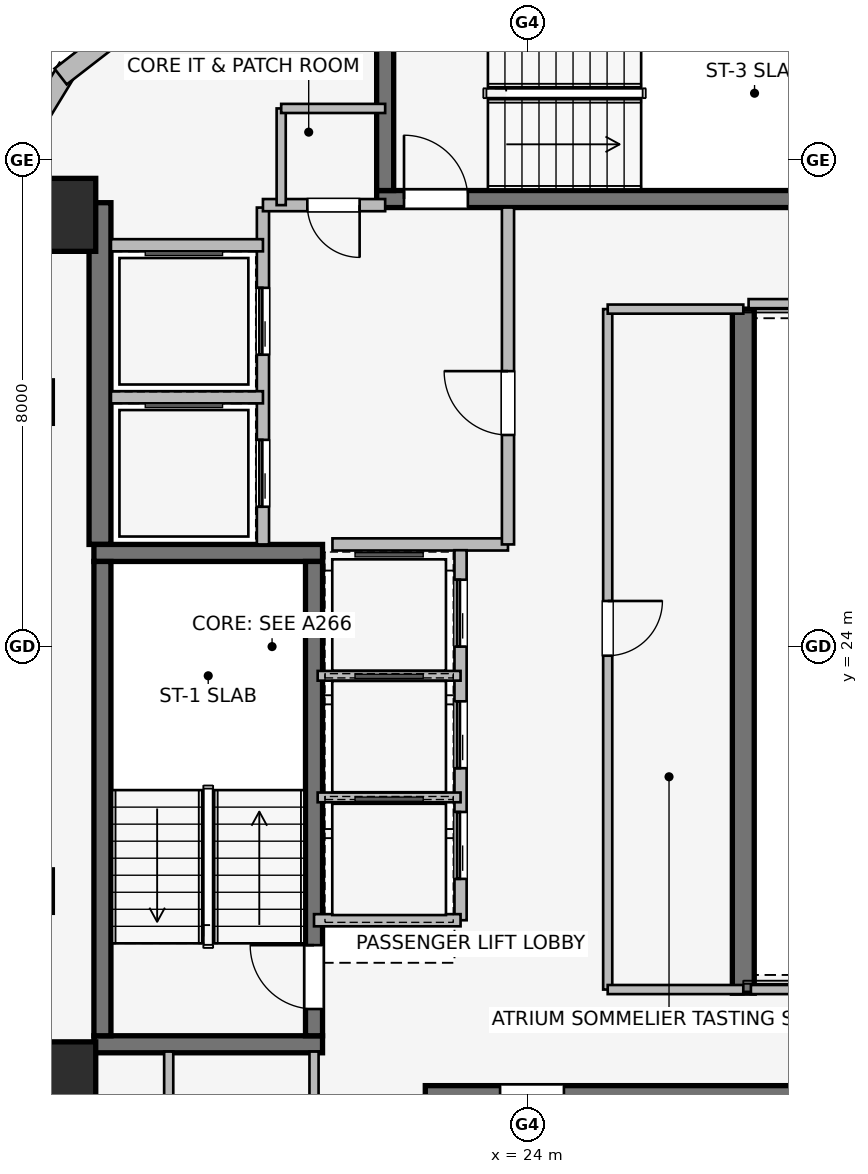
"""IFC4 building model, lengths in metres.
Left out: names, types, materials, properties, quantities, classifications, styles, units other than length and angle.
Written with IfcOpenShell. Run it as: python <this file> out.ifc"""

import sys

from ifc_helpers import new_model, si_unit, direction, frame, frame_2d, origin, origin_2d, place, context, subcontext, project, spatial, rectangle, extrude, element, fill, save


model = new_model("IFC4")
c1 = context("Model", 3, precision=1e-05, world=origin(), true_north=direction((0.0, 1.0)))
c2 = subcontext(c1, "Body", "Model", "MODEL_VIEW")
j1 = project(units=[si_unit("LENGTHUNIT", "METRE"), si_unit("PLANEANGLEUNIT", "RADIAN")], contexts=[c1])
p1 = place(None, origin())
s1 = spatial("IfcSite", under=j1, at=p1, CompositionType="ELEMENT")
p2 = place(p1, origin())
s2 = spatial("IfcBuilding", under=s1, at=p2, CompositionType="ELEMENT")
p3 = place(p2, frame((0.0, 0.0, 234.8)))
s3 = spatial("IfcBuildingStorey", under=s2, at=p3, CompositionType="ELEMENT", Elevation=234.8)
p4 = place(p3, frame((16.97, 25.68, 0.0), z_axis=(0.0, 0.0, 1.0), x_axis=(0.0, 1.0, 0.0)))
e1 = element("IfcWall", 1, at=p4, inside=s3, PredefinedType="SHEAR", context=c2, shape_type="SweptSolid", body=[
    extrude(rectangle(XDim=5.62, YDim=0.36, at=frame_2d((2.81, 0.0))), origin(), (0.0, 0.0, 1.0), 3.55),
])
p5 = place(p3, frame((27.55, 29.55, 0.0), z_axis=(0.0, 0.0, 1.0), x_axis=(0.0, -1.0, 0.0)))
e2 = element("IfcWall", 2, at=p5, inside=s3, PredefinedType="SHEAR", context=c2, shape_type="SweptSolid", body=[
    extrude(rectangle(XDim=11.25, YDim=0.36, at=frame_2d((5.625, 0.0))), origin(), (0.0, 0.0, 1.0), 3.55),
])
for number, where, z_axis, x_axis in (
    (3, (16.87, 17.46, 0.0), (0.0, 0.0, 1.0), (1.0, 0.0, 0.0)),
    (4, (20.63, 25.54, 0.0), (0.0, 0.0, 1.0), (-1.0, 0.0, 0.0)),
):
    element("IfcWall", number, at=place(p3, frame(where, z_axis=z_axis, x_axis=x_axis)), inside=s3, PredefinedType="SHEAR", context=c2, shape_type="SweptSolid", body=[
        extrude(rectangle(XDim=3.76, YDim=0.28, at=frame_2d((1.88, 0.0))), origin(), (0.0, 0.0, 1.0), 3.55),
    ])
p6 = place(p3, frame((17.01, 25.4, 0.0), z_axis=(0.0, 0.0, 1.0), x_axis=(0.0, -1.0, 0.0)))
e5 = element("IfcWall", 5, at=p6, inside=s3, PredefinedType="SHEAR", context=c2, shape_type="SweptSolid", body=[
    extrude(rectangle(XDim=7.8, YDim=0.28, at=frame_2d((3.9, 0.0))), origin(), (0.0, 0.0, 1.0), 3.55),
])
p7 = place(p3, frame((20.49, 17.6, 0.0), z_axis=(0.0, 0.0, 1.0), x_axis=(0.0, 1.0, 0.0)))
e6 = element("IfcWall", 6, at=p7, inside=s3, PredefinedType="SHEAR", context=c2, shape_type="SweptSolid", body=[
    extrude(rectangle(XDim=7.8, YDim=0.28, at=frame_2d((3.9, 0.0))), origin(), (0.0, 0.0, 1.0), 3.55),
])
p8 = place(p7, frame((0.44, 0.0, 0.0)))
e7 = element("IfcOpeningElement", 7, at=p8, cuts=e6, PredefinedType="OPENING", context=c2, shape_type="SweptSolid", body=[
    extrude(rectangle(XDim=1.05, YDim=2.0, at=frame_2d((0.525, 1.0))), frame((0.0, 0.15, 0.0), z_axis=(0.0, -1.0, 0.0), x_axis=(1.0, 0.0, 0.0)), (0.0, 0.0, 1.0), 0.3),
])
p9 = place(p3, frame((30.68, 16.64, 0.0), z_axis=(0.0, 0.0, 1.0), x_axis=(-1.0, 0.0, 0.0)))
e8 = element("IfcWall", 8, at=p9, inside=s3, PredefinedType="SHEAR", context=c2, shape_type="SweptSolid", body=[
    extrude(rectangle(XDim=8.36, YDim=0.28, at=frame_2d((4.18, 0.0))), origin(), (0.0, 0.0, 1.0), 3.55),
])
p10 = place(p9, frame((6.08, 0.0, 0.0)))
e9 = element("IfcOpeningElement", 9, at=p10, cuts=e8, PredefinedType="OPENING", context=c2, shape_type="SweptSolid", body=[
    extrude(rectangle(XDim=1.05, YDim=2.0, at=frame_2d((0.525, 1.0))), frame((0.0, 0.15, 0.0), z_axis=(0.0, -1.0, 0.0), x_axis=(1.0, 0.0, 0.0)), (0.0, 0.0, 1.0), 0.3),
])
p11 = place(p3, frame((21.52, 31.36, 0.0), z_axis=(0.0, 0.0, 1.0), x_axis=(1.0, 0.0, 0.0)))
e10 = element("IfcWall", 10, at=p11, inside=s3, PredefinedType="SHEAR", context=c2, shape_type="SweptSolid", body=[
    extrude(rectangle(XDim=8.36, YDim=0.28, at=frame_2d((4.18, 0.0))), origin(), (0.0, 0.0, 1.0), 3.55),
])
p12 = place(p11, frame((0.45, 0.0, 0.0)))
e11 = element("IfcOpeningElement", 11, at=p12, cuts=e10, PredefinedType="OPENING", context=c2, shape_type="SweptSolid", body=[
    extrude(rectangle(XDim=1.05, YDim=2.0, at=frame_2d((0.525, 1.0))), frame((0.0, 0.15, 0.0), z_axis=(0.0, -1.0, 0.0), x_axis=(1.0, 0.0, 0.0)), (0.0, 0.0, 1.0), 0.3),
])
p13 = place(p3, frame((21.66, 34.7, 0.0), z_axis=(0.0, 0.0, 1.0), x_axis=(0.0, -1.0, 0.0)))
e12 = element("IfcWall", 12, at=p13, inside=s3, PredefinedType="SHEAR", context=c2, shape_type="SweptSolid", body=[
    extrude(rectangle(XDim=3.2, YDim=0.28, at=frame_2d((1.6, 0.0))), origin(), (0.0, 0.0, 1.0), 3.55),
])
for number, where, z_axis, x_axis in (
    (13, (16.3, 16.9, 0.0), (0.0, 0.0, 1.0), (1.0, 0.0, 0.0)),
    (14, (16.3, 31.1, 0.0), (0.0, 0.0, 1.0), (1.0, 0.0, 0.0)),
):
    element("IfcColumn", number, at=place(p3, frame(where, z_axis=z_axis, x_axis=x_axis)), inside=s3, PredefinedType="COLUMN", context=c2, shape_type="SweptSolid", body=[
        extrude(rectangle(XDim=1.2, YDim=1.2, at=origin_2d()), origin(), (0.0, 0.0, 1.0), 3.55),
    ])
p14 = place(p3, frame((15.574, 32.082, 0.0), z_axis=(0.0, 0.0, 1.0), x_axis=(0.520325409202, 0.853968072318, 0.0)))
e15 = element("IfcWall", 15, at=p14, inside=s3, PredefinedType="STANDARD", context=c2, shape_type="SweptSolid", body=[
    extrude(rectangle(XDim=1.678, YDim=0.33, at=frame_2d((0.839, 0.0))), origin(), (0.0, 0.0, 1.0), 3.26),
])
p15 = place(p3, frame((16.322, 33.375, 0.0), z_axis=(0.0, 0.0, 1.0), x_axis=(0.790691856293, 0.61221433207, 0.0)))
e16 = element("IfcWall", 16, at=p15, inside=s3, PredefinedType="STANDARD", context=c2, shape_type="SweptSolid", body=[
    extrude(rectangle(XDim=1.676, YDim=0.33, at=frame_2d((0.838, 0.0))), origin(), (0.0, 0.0, 1.0), 3.26),
])
p16 = place(p3, frame((19.65, 25.68, 0.0), z_axis=(0.0, 0.0, 1.0), x_axis=(0.0, 1.0, 0.0)))
e17 = element("IfcWall", 17, at=p16, inside=s3, PredefinedType="PARTITIONING", context=c2, shape_type="SweptSolid", body=[
    extrude(rectangle(XDim=5.54, YDim=0.2, at=frame_2d((2.77, 0.0))), origin(), (0.0, 0.0, 1.0), 3.26),
])
p17 = place(p16, frame((0.62, 0.0, 0.0)))
e18 = element("IfcOpeningElement", 18, at=p17, cuts=e17, PredefinedType="OPENING", context=c2, shape_type="SweptSolid", body=[
    extrude(rectangle(XDim=1.1, YDim=2.2, at=frame_2d((0.55, 1.1))), frame((0.0, 0.11, 0.0), z_axis=(0.0, -1.0, 0.0), x_axis=(1.0, 0.0, 0.0)), (0.0, 0.0, 1.0), 0.22),
])
p18 = place(p16, frame((3.12, 0.0, 0.0)))
e19 = element("IfcOpeningElement", 19, at=p18, cuts=e17, PredefinedType="OPENING", context=c2, shape_type="SweptSolid", body=[
    extrude(rectangle(XDim=1.1, YDim=2.2, at=frame_2d((0.55, 1.1))), frame((0.0, 0.11, 0.0), z_axis=(0.0, -1.0, 0.0), x_axis=(1.0, 0.0, 0.0)), (0.0, 0.0, 1.0), 0.22),
])
p19 = place(p3, frame((20.793, 25.68, 0.0), z_axis=(0.0, 0.0, 1.0), x_axis=(1.0, 0.0, 0.0)))
e20 = element("IfcWall", 20, at=p19, inside=s3, PredefinedType="PARTITIONING", context=c2, shape_type="SweptSolid", body=[
    extrude(rectangle(XDim=2.887, YDim=0.2, at=frame_2d((1.443, 0.0))), origin(), (0.0, 0.0, 1.0), 3.26),
])
p20 = place(p3, frame((23.68, 25.68, 0.0), z_axis=(0.0, 0.0, 1.0), x_axis=(0.0, 1.0, 0.0)))
e21 = element("IfcWall", 21, at=p20, inside=s3, PredefinedType="PARTITIONING", context=c2, shape_type="SweptSolid", body=[
    extrude(rectangle(XDim=5.54, YDim=0.2, at=frame_2d((2.77, 0.0))), origin(), (0.0, 0.0, 1.0), 3.26),
])
p21 = place(p20, frame((1.8, 0.0, 0.0)))
e22 = element("IfcOpeningElement", 22, at=p21, cuts=e21, PredefinedType="OPENING", context=c2, shape_type="SweptSolid", body=[
    extrude(rectangle(XDim=1.05, YDim=2.0, at=frame_2d((0.525, 1.0))), frame((0.0, 0.11, 0.0), z_axis=(0.0, -1.0, 0.0), x_axis=(1.0, 0.0, 0.0)), (0.0, 0.0, 1.0), 0.22),
])
p22 = place(p3, frame((21.66, 31.26, 0.0), z_axis=(0.0, 0.0, 1.0), x_axis=(-1.0, 0.0, 0.0)))
e23 = element("IfcWall", 23, at=p22, inside=s3, PredefinedType="PARTITIONING", context=c2, shape_type="SweptSolid", body=[
    extrude(rectangle(XDim=2.01, YDim=0.2, at=frame_2d((1.005, 0.0))), origin(), (0.0, 0.0, 1.0), 3.26),
])
p23 = place(p22, frame((0.42, 0.0, 0.0)))
e24 = element("IfcOpeningElement", 24, at=p23, cuts=e23, PredefinedType="OPENING", context=c2, shape_type="SweptSolid", body=[
    extrude(rectangle(XDim=0.86, YDim=2.0, at=frame_2d((0.43, 1.0))), frame((0.0, 0.11, 0.0), z_axis=(0.0, -1.0, 0.0), x_axis=(1.0, 0.0, 0.0)), (0.0, 0.0, 1.0), 0.22),
])
p24 = place(p3, frame((17.15, 28.1, 0.0), z_axis=(0.0, 0.0, 1.0), x_axis=(1.0, 0.0, 0.0)))
e25 = element("IfcWall", 25, at=p24, inside=s3, PredefinedType="PARTITIONING", context=c2, shape_type="SweptSolid", body=[
    extrude(rectangle(XDim=2.5, YDim=0.2, at=frame_2d((1.25, 0.0))), origin(), (0.0, 0.0, 1.0), 3.26),
])
p25 = place(p3, frame((19.65, 30.6, 0.0), z_axis=(0.0, 0.0, 1.0), x_axis=(-1.0, 0.0, 0.0)))
e26 = element("IfcWall", 26, at=p25, inside=s3, PredefinedType="PARTITIONING", context=c2, shape_type="SweptSolid", body=[
    extrude(rectangle(XDim=2.5, YDim=0.2, at=frame_2d((1.25, 0.0))), origin(), (0.0, 0.0, 1.0), 2.16),
])
p26 = place(p3, frame((22.9, 19.5, 0.0), z_axis=(0.0, 0.0, 1.0), x_axis=(0.0, 1.0, 0.0)))
e27 = element("IfcWall", 27, at=p26, inside=s3, PredefinedType="PARTITIONING", context=c2, shape_type="SweptSolid", body=[
    extrude(rectangle(XDim=6.085, YDim=0.2, at=frame_2d((3.042, 0.0))), origin(), (0.0, 0.0, 1.0), 3.26),
])
p27 = place(p26, frame((0.68, 0.0, 0.0)))
e28 = element("IfcOpeningElement", 28, at=p27, cuts=e27, PredefinedType="OPENING", context=c2, shape_type="SweptSolid", body=[
    extrude(rectangle(XDim=1.1, YDim=2.2, at=frame_2d((0.55, 1.1))), frame((0.0, 0.11, 0.0), z_axis=(0.0, -1.0, 0.0), x_axis=(1.0, 0.0, 0.0)), (0.0, 0.0, 1.0), 0.22),
])
p28 = place(p26, frame((2.5, 0.0, 0.0)))
e29 = element("IfcOpeningElement", 29, at=p28, cuts=e27, PredefinedType="OPENING", context=c2, shape_type="SweptSolid", body=[
    extrude(rectangle(XDim=1.1, YDim=2.2, at=frame_2d((0.55, 1.1))), frame((0.0, 0.11, 0.0), z_axis=(0.0, -1.0, 0.0), x_axis=(1.0, 0.0, 0.0)), (0.0, 0.0, 1.0), 0.22),
])
p29 = place(p26, frame((4.5, 0.0, 0.0)))
e30 = element("IfcOpeningElement", 30, at=p29, cuts=e27, PredefinedType="OPENING", context=c2, shape_type="SweptSolid", body=[
    extrude(rectangle(XDim=1.1, YDim=2.2, at=frame_2d((0.55, 1.1))), frame((0.0, 0.11, 0.0), z_axis=(0.0, -1.0, 0.0), x_axis=(1.0, 0.0, 0.0)), (0.0, 0.0, 1.0), 0.22),
])
p30 = place(p3, frame((20.49, 19.5, 0.0), z_axis=(0.0, 0.0, 1.0), x_axis=(1.0, 0.0, 0.0)))
e31 = element("IfcWall", 31, at=p30, inside=s3, PredefinedType="PARTITIONING", context=c2, shape_type="SweptSolid", body=[
    extrude(rectangle(XDim=2.41, YDim=0.2, at=frame_2d((1.205, 0.0))), origin(), (0.0, 0.0, 1.0), 2.16),
])
for number, where, z_axis, x_axis in (
    (32, (20.55, 21.52, 0.0), (0.0, 0.0, 1.0), (1.0, 0.0, 0.0)),
    (33, (20.55, 23.52, 0.0), (0.0, 0.0, 1.0), (1.0, 0.0, 0.0)),
):
    element("IfcWall", number, at=place(p3, frame(where, z_axis=z_axis, x_axis=x_axis)), inside=s3, PredefinedType="PARTITIONING", context=c2, shape_type="SweptSolid", body=[
        extrude(rectangle(XDim=2.35, YDim=0.16, at=frame_2d((1.175, 0.0))), origin(), (0.0, 0.0, 1.0), 3.26),
    ])
p31 = place(p3, frame((25.32, 29.55, 0.0), z_axis=(0.0, 0.0, 1.0), x_axis=(0.0, -1.0, 0.0)))
e34 = element("IfcWall", 34, at=p31, inside=s3, PredefinedType="PARTITIONING", context=c2, shape_type="SweptSolid", body=[
    extrude(rectangle(XDim=11.19, YDim=0.15, at=frame_2d((5.595, 0.0))), origin(), (0.0, 0.0, 1.0), 3.26),
])
p32 = place(p31, frame((4.8, 0.0, 0.0)))
e35 = element("IfcOpeningElement", 35, at=p32, cuts=e34, PredefinedType="OPENING", context=c2, shape_type="SweptSolid", body=[
    extrude(rectangle(XDim=0.9, YDim=2.0, at=frame_2d((0.45, 1.0))), frame((0.0, 0.085, 0.0), z_axis=(0.0, -1.0, 0.0), x_axis=(1.0, 0.0, 0.0)), (0.0, 0.0, 1.0), 0.17),
])
p33 = place(p3, frame((25.32, 18.36, 0.0), z_axis=(0.0, 0.0, 1.0), x_axis=(1.0, 0.0, 0.0)))
e36 = element("IfcWall", 36, at=p33, inside=s3, PredefinedType="PARTITIONING", context=c2, shape_type="SweptSolid", body=[
    extrude(rectangle(XDim=2.23, YDim=0.15, at=frame_2d((1.115, 0.0))), origin(), (0.0, 0.0, 1.0), 3.26),
])
p34 = place(p3, frame((27.55, 29.55, 0.0), z_axis=(0.0, 0.0, 1.0), x_axis=(-1.0, 0.0, 0.0)))
e37 = element("IfcWall", 37, at=p34, inside=s3, PredefinedType="PARTITIONING", context=c2, shape_type="SweptSolid", body=[
    extrude(rectangle(XDim=2.23, YDim=0.15, at=frame_2d((1.115, 0.0))), origin(), (0.0, 0.0, 1.0), 2.16),
])
p35 = place(p3, frame((18.1, 17.34, 0.0), z_axis=(0.0, 0.0, 1.0), x_axis=(0.0, -1.0, 0.0)))
e38 = element("IfcWall", 38, at=p35, inside=s3, PredefinedType="PARTITIONING", context=c2, shape_type="SweptSolid", body=[
    extrude(rectangle(XDim=4.133, YDim=0.15, at=frame_2d((2.066, 0.0))), origin(), (0.0, 0.0, 1.0), 3.26),
])
p36 = place(p3, frame((20.49, 13.2, 0.0), z_axis=(0.0, 0.0, 1.0), x_axis=(0.0, 1.0, 0.0)))
e39 = element("IfcWall", 39, at=p36, inside=s3, PredefinedType="PARTITIONING", context=c2, shape_type="SweptSolid", body=[
    extrude(rectangle(XDim=4.14, YDim=0.15, at=frame_2d((2.07, 0.0))), origin(), (0.0, 0.0, 1.0), 3.26),
])
p37 = place(p36, frame((1.25, 0.0, 0.0)))
e40 = element("IfcOpeningElement", 40, at=p37, cuts=e39, PredefinedType="OPENING", context=c2, shape_type="SweptSolid", body=[
    extrude(rectangle(XDim=0.9, YDim=2.0, at=frame_2d((0.45, 1.0))), frame((0.0, 0.085, 0.0), z_axis=(0.0, -1.0, 0.0), x_axis=(1.0, 0.0, 0.0)), (0.0, 0.0, 1.0), 0.17),
])
p38 = place(p3, frame((19.95, 32.85, 0.0), z_axis=(0.0, 0.0, 1.0), x_axis=(0.0, -1.0, 0.0)))
e41 = element("IfcWall", 41, at=p38, inside=s3, PredefinedType="PARTITIONING", context=c2, shape_type="SweptSolid", body=[
    extrude(rectangle(XDim=1.59, YDim=0.15, at=frame_2d((0.795, 0.0))), origin(), (0.0, 0.0, 1.0), 3.26),
])
p39 = place(p3, frame((21.66, 32.85, 0.0), z_axis=(0.0, 0.0, 1.0), x_axis=(-1.0, 0.0, 0.0)))
e42 = element("IfcWall", 42, at=p39, inside=s3, PredefinedType="PARTITIONING", context=c2, shape_type="SweptSolid", body=[
    extrude(rectangle(XDim=1.71, YDim=0.15, at=frame_2d((0.855, 0.0))), origin(), (0.0, 0.0, 1.0), 3.26),
])
p40 = place(p3, frame((27.675, 18.36, 0.0), z_axis=(0.0, 0.0, 1.0), x_axis=(1.0, 0.0, 0.0)))
e43 = element("IfcWall", 43, at=p40, inside=s3, PredefinedType="PARTITIONING", context=c2, shape_type="SweptSolid", body=[
    extrude(rectangle(XDim=12.165, YDim=0.15, at=frame_2d((6.083, 0.0))), origin(), (0.0, 0.0, 1.0), 2.401),
])
p41 = place(p3, frame((39.84, 29.64, 0.0), z_axis=(0.0, 0.0, 1.0), x_axis=(-1.0, 0.0, 0.0)))
e44 = element("IfcWall", 44, at=p41, inside=s3, PredefinedType="PARTITIONING", context=c2, shape_type="SweptSolid", body=[
    extrude(rectangle(XDim=12.203, YDim=0.15, at=frame_2d((6.102, 0.0))), origin(), (0.0, 0.0, 1.0), 2.401),
])
p42 = place(p8, origin())
e45 = element("IfcDoor", 45, at=p42, inside=s3, OperationType="SINGLE_SWING_RIGHT", PredefinedType="DOOR", context=c2, shape_type="SweptSolid", body=[
    extrude(rectangle(XDim=1.05, YDim=2.0, at=frame_2d((0.525, 1.0))), frame((0.0, 0.025, 0.0), z_axis=(0.0, -1.0, 0.0), x_axis=(1.0, 0.0, 0.0)), (0.0, 0.0, 1.0), 0.05),
])
fill(e7, e45)
p43 = place(p10, origin())
e46 = element("IfcDoor", 46, at=p43, inside=s3, OperationType="SINGLE_SWING_RIGHT", PredefinedType="DOOR", context=c2, shape_type="SweptSolid", body=[
    extrude(rectangle(XDim=1.05, YDim=2.0, at=frame_2d((0.525, 1.0))), frame((0.0, 0.025, 0.0), z_axis=(0.0, -1.0, 0.0), x_axis=(1.0, 0.0, 0.0)), (0.0, 0.0, 1.0), 0.05),
])
fill(e9, e46)
p44 = place(p12, origin())
e47 = element("IfcDoor", 47, at=p44, inside=s3, OperationType="SINGLE_SWING_LEFT", PredefinedType="DOOR", context=c2, shape_type="SweptSolid", body=[
    extrude(rectangle(XDim=1.05, YDim=2.0, at=frame_2d((0.525, 1.0))), frame((0.0, 0.025, 0.0), z_axis=(0.0, -1.0, 0.0), x_axis=(1.0, 0.0, 0.0)), (0.0, 0.0, 1.0), 0.05),
])
fill(e11, e47)
p45 = place(p17, origin())
e48 = element("IfcDoor", 48, at=p45, inside=s3, OperationType="SLIDING_TO_LEFT", PredefinedType="DOOR", context=c2, shape_type="SweptSolid", body=[
    extrude(rectangle(XDim=1.1, YDim=2.2, at=frame_2d((0.55, 1.1))), frame((0.0, 0.025, 0.0), z_axis=(0.0, -1.0, 0.0), x_axis=(1.0, 0.0, 0.0)), (0.0, 0.0, 1.0), 0.05),
])
fill(e18, e48)
p46 = place(p18, origin())
e49 = element("IfcDoor", 49, at=p46, inside=s3, OperationType="SLIDING_TO_LEFT", PredefinedType="DOOR", context=c2, shape_type="SweptSolid", body=[
    extrude(rectangle(XDim=1.1, YDim=2.2, at=frame_2d((0.55, 1.1))), frame((0.0, 0.025, 0.0), z_axis=(0.0, -1.0, 0.0), x_axis=(1.0, 0.0, 0.0)), (0.0, 0.0, 1.0), 0.05),
])
fill(e19, e49)
p47 = place(p21, origin())
e50 = element("IfcDoor", 50, at=p47, inside=s3, OperationType="SINGLE_SWING_RIGHT", PredefinedType="DOOR", context=c2, shape_type="SweptSolid", body=[
    extrude(rectangle(XDim=1.05, YDim=2.0, at=frame_2d((0.525, 1.0))), frame((0.0, 0.025, 0.0), z_axis=(0.0, -1.0, 0.0), x_axis=(1.0, 0.0, 0.0)), (0.0, 0.0, 1.0), 0.05),
])
fill(e22, e50)
p48 = place(p23, origin())
e51 = element("IfcDoor", 51, at=p48, inside=s3, OperationType="SINGLE_SWING_LEFT", PredefinedType="DOOR", context=c2, shape_type="SweptSolid", body=[
    extrude(rectangle(XDim=0.86, YDim=2.0, at=frame_2d((0.43, 1.0))), frame((0.0, 0.025, 0.0), z_axis=(0.0, -1.0, 0.0), x_axis=(1.0, 0.0, 0.0)), (0.0, 0.0, 1.0), 0.05),
])
fill(e24, e51)
p49 = place(p27, origin())
e52 = element("IfcDoor", 52, at=p49, inside=s3, OperationType="SLIDING_TO_LEFT", PredefinedType="DOOR", context=c2, shape_type="SweptSolid", body=[
    extrude(rectangle(XDim=1.1, YDim=2.2, at=frame_2d((0.55, 1.1))), frame((0.0, 0.025, 0.0), z_axis=(0.0, -1.0, 0.0), x_axis=(1.0, 0.0, 0.0)), (0.0, 0.0, 1.0), 0.05),
])
fill(e28, e52)
p50 = place(p28, origin())
e53 = element("IfcDoor", 53, at=p50, inside=s3, OperationType="SLIDING_TO_LEFT", PredefinedType="DOOR", context=c2, shape_type="SweptSolid", body=[
    extrude(rectangle(XDim=1.1, YDim=2.2, at=frame_2d((0.55, 1.1))), frame((0.0, 0.025, 0.0), z_axis=(0.0, -1.0, 0.0), x_axis=(1.0, 0.0, 0.0)), (0.0, 0.0, 1.0), 0.05),
])
fill(e29, e53)
p51 = place(p29, origin())
e54 = element("IfcDoor", 54, at=p51, inside=s3, OperationType="SLIDING_TO_LEFT", PredefinedType="DOOR", context=c2, shape_type="SweptSolid", body=[
    extrude(rectangle(XDim=1.1, YDim=2.2, at=frame_2d((0.55, 1.1))), frame((0.0, 0.025, 0.0), z_axis=(0.0, -1.0, 0.0), x_axis=(1.0, 0.0, 0.0)), (0.0, 0.0, 1.0), 0.05),
])
fill(e30, e54)
p52 = place(p32, origin())
e55 = element("IfcDoor", 55, at=p52, inside=s3, OperationType="SINGLE_SWING_LEFT", PredefinedType="DOOR", context=c2, shape_type="SweptSolid", body=[
    extrude(rectangle(XDim=0.9, YDim=2.0, at=frame_2d((0.45, 1.0))), frame((0.0, 0.025, 0.0), z_axis=(0.0, -1.0, 0.0), x_axis=(1.0, 0.0, 0.0)), (0.0, 0.0, 1.0), 0.05),
])
fill(e35, e55)
save(model, sys.argv[1])
